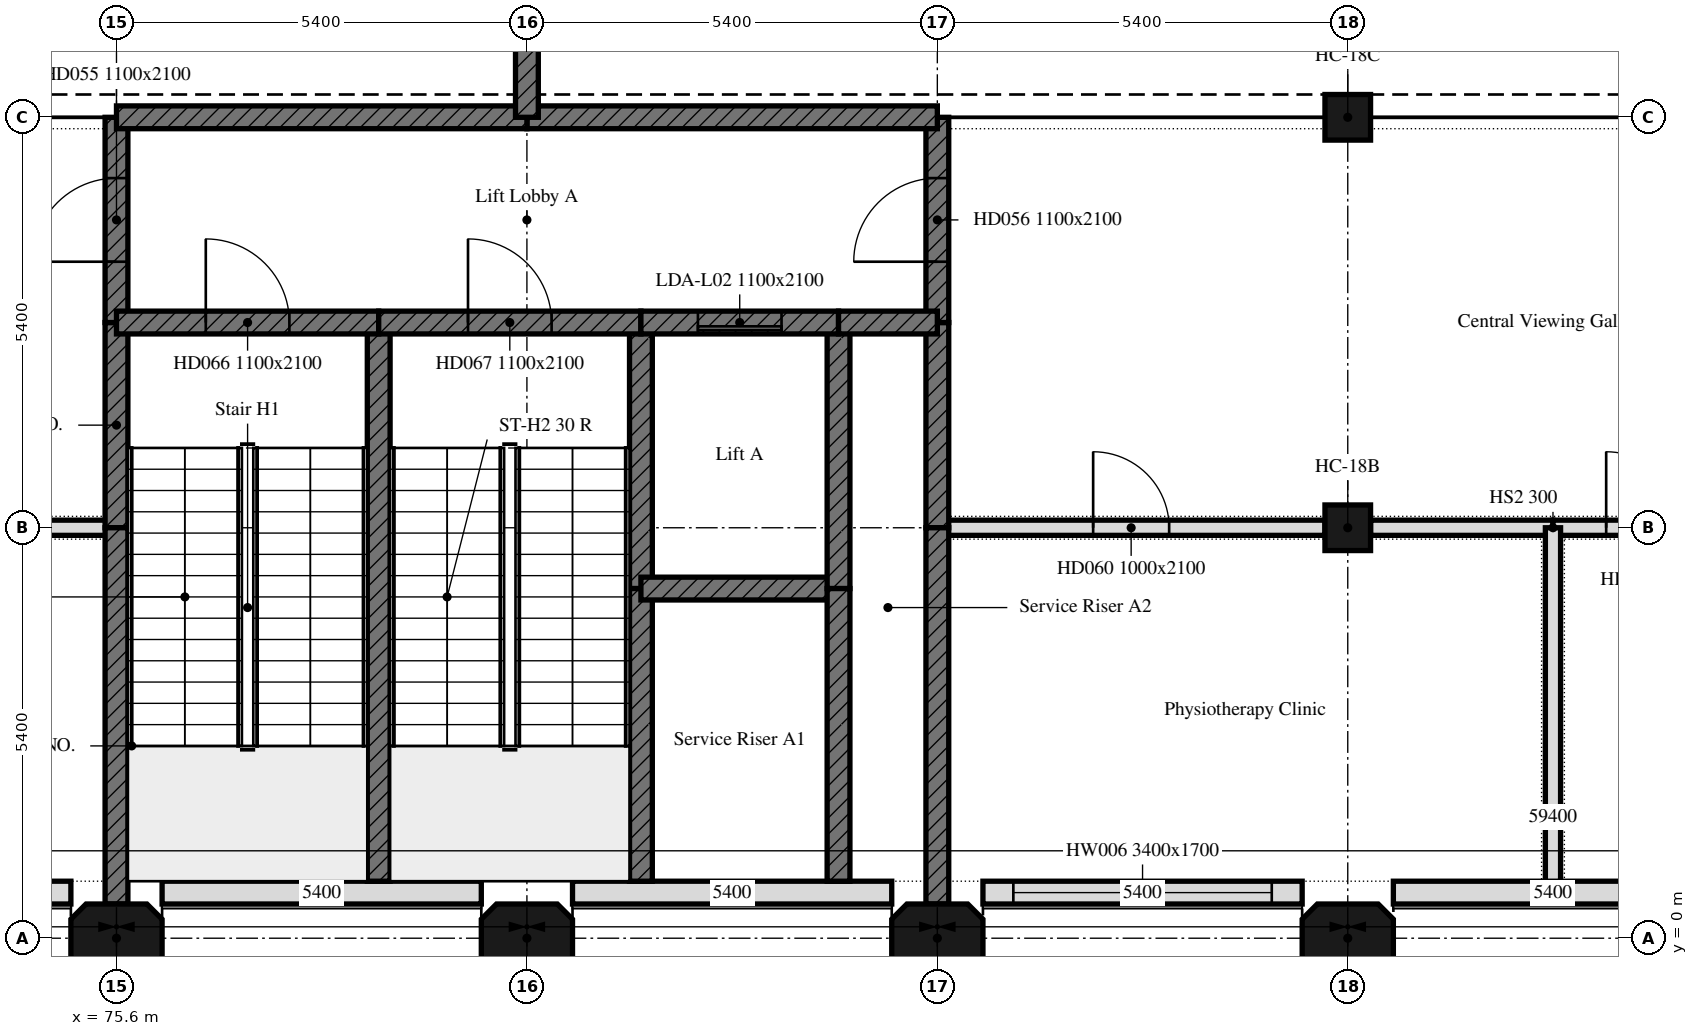
"""IFC4 building model, lengths in metres.
Left out: names, types, materials, properties, quantities, classifications, styles, units other than length and angle.
Written with IfcOpenShell. Run it as: python <this file> out.ifc"""

import sys

from ifc_helpers import new_model, si_unit, direction, frame, frame_2d, origin, origin_2d, place, context, subcontext, project, spatial, polyline, rectangle, outline, extrude, element, fill, save


model = new_model("IFC4")
c1 = context("Model", 3, precision=1e-05, world=origin(), true_north=direction((0.0, 1.0)))
c2 = subcontext(c1, "Body", "Model", "MODEL_VIEW")
j1 = project(units=[si_unit("LENGTHUNIT", "METRE"), si_unit("PLANEANGLEUNIT", "RADIAN")], contexts=[c1])
p1 = place(None, origin())
s1 = spatial("IfcSite", under=j1, at=p1, CompositionType="ELEMENT")
p2 = place(p1, origin())
s2 = spatial("IfcBuilding", under=s1, at=p2, CompositionType="ELEMENT")
p3 = place(p2, frame((0.0, 0.0, 14.4)))
s3 = spatial("IfcBuildingStorey", under=s2, at=p3, CompositionType="ELEMENT", Elevation=14.4)
for number, where, z_axis, x_axis in (
    (1, (75.6, 0.0, 0.0), (0.0, 0.0, 1.0), (1.0, 0.0, 0.0)),
    (2, (81.0, 0.0, 0.0), (0.0, 0.0, 1.0), (1.0, 0.0, 0.0)),
    (3, (86.4, 0.0, 0.0), (0.0, 0.0, 1.0), (1.0, 0.0, 0.0)),
    (4, (91.8, 0.0, 0.0), (0.0, 0.0, 1.0), (1.0, 0.0, 0.0)),
):
    element("IfcColumn", number, at=place(p3, frame(where, z_axis=z_axis, x_axis=x_axis)), inside=s3, PredefinedType="COLUMN", context=c2, shape_type="SweptSolid", body=[
        extrude(outline(polyline([(-0.4, -0.45), (0.4, -0.45), (0.6, -0.25), (0.6, 0.25), (0.4, 0.45), (-0.4, 0.45), (-0.6, 0.25), (-0.6, -0.25), (-0.4, -0.45)])), origin(), (0.0, 0.0, 1.0), 5.1),
    ])
for number, where, z_axis, x_axis in (
    (5, (91.8, 5.4, 0.0), (0.0, 0.0, 1.0), (1.0, 0.0, 0.0)),
    (6, (91.8, 10.8, 0.0), (0.0, 0.0, 1.0), (1.0, 0.0, 0.0)),
):
    element("IfcColumn", number, at=place(p3, frame(where, z_axis=z_axis, x_axis=x_axis)), inside=s3, PredefinedType="COLUMN", context=c2, shape_type="SweptSolid", body=[
        extrude(rectangle(XDim=0.6, YDim=0.6, at=origin_2d()), origin(), (0.0, 0.0, 1.0), 5.1),
    ])
for number, where, z_axis, x_axis in (
    (7, (70.8, 0.6, 0.0), (0.0, 0.0, 1.0), (1.0, 0.0, 0.0)),
    (8, (76.2, 0.6, 0.0), (0.0, 0.0, 1.0), (1.0, 0.0, 0.0)),
    (9, (81.6, 0.6, 0.0), (0.0, 0.0, 1.0), (1.0, 0.0, 0.0)),
):
    element("IfcWall", number, at=place(p3, frame(where, z_axis=z_axis, x_axis=x_axis)), inside=s3, PredefinedType="SOLIDWALL", context=c2, shape_type="SweptSolid", body=[
        extrude(rectangle(XDim=4.2, YDim=0.3, at=frame_2d((2.1, 0.0))), origin(), (0.0, 0.0, 1.0), 5.1),
    ])
p4 = place(p3, frame((87.0, 0.6, 0.0), z_axis=(0.0, 0.0, 1.0), x_axis=(1.0, 0.0, 0.0)))
e10 = element("IfcWall", 10, at=p4, inside=s3, PredefinedType="SOLIDWALL", context=c2, shape_type="SweptSolid", body=[
    extrude(rectangle(XDim=4.2, YDim=0.3, at=frame_2d((2.1, 0.0))), origin(), (0.0, 0.0, 1.0), 5.1),
])
p5 = place(p4, frame((0.4, 0.0, 0.9)))
e11 = element("IfcOpeningElement", 11, at=p5, cuts=e10, PredefinedType="OPENING", context=c2, shape_type="SweptSolid", body=[
    extrude(rectangle(XDim=3.4, YDim=1.7, at=frame_2d((1.7, 0.85))), frame((0.0, 0.15, 0.0), z_axis=(0.0, -1.0, 0.0), x_axis=(1.0, 0.0, 0.0)), (0.0, 0.0, 1.0), 0.3),
])
p6 = place(p3, frame((92.4, 0.6, 0.0), z_axis=(0.0, 0.0, 1.0), x_axis=(1.0, 0.0, 0.0)))
e12 = element("IfcWall", 12, at=p6, inside=s3, PredefinedType="SOLIDWALL", context=c2, shape_type="SweptSolid", body=[
    extrude(rectangle(XDim=4.2, YDim=0.3, at=frame_2d((2.1, 0.0))), origin(), (0.0, 0.0, 1.0), 5.1),
])
p7 = place(p3, frame((70.5, 5.4, 0.0), z_axis=(0.0, 0.0, 1.0), x_axis=(1.0, 0.0, 0.0)))
e13 = element("IfcWall", 13, at=p7, inside=s3, PredefinedType="PARTITIONING", context=c2, shape_type="SweptSolid", body=[
    extrude(rectangle(XDim=5.1, YDim=0.2, at=frame_2d((2.55, 0.0))), origin(), (0.0, 0.0, 1.0), 5.1),
])
p8 = place(p3, frame((75.6, 5.4, 0.0), z_axis=(0.0, 0.0, 1.0), x_axis=(0.0, 1.0, 0.0)))
e14 = element("IfcWall", 14, at=p8, inside=s3, PredefinedType="SHEAR", context=c2, shape_type="SweptSolid", body=[
    extrude(rectangle(XDim=2.7, YDim=0.3, at=frame_2d((1.35, 0.0))), origin(), (0.0, 0.0, 1.0), 5.1),
])
p9 = place(p3, frame((75.6, 8.1, 0.0), z_axis=(0.0, 0.0, 1.0), x_axis=(0.0, 1.0, 0.0)))
e15 = element("IfcWall", 15, at=p9, inside=s3, PredefinedType="SHEAR", context=c2, shape_type="SweptSolid", body=[
    extrude(rectangle(XDim=2.7, YDim=0.3, at=frame_2d((1.35, 0.0))), origin(), (0.0, 0.0, 1.0), 5.1),
])
p10 = place(p9, frame((0.8, 0.0, 0.0)))
e16 = element("IfcOpeningElement", 16, at=p10, cuts=e15, PredefinedType="OPENING", context=c2, shape_type="SweptSolid", body=[
    extrude(rectangle(XDim=1.1, YDim=2.1, at=frame_2d((0.55, 1.05))), frame((0.0, 0.15, 0.0), z_axis=(0.0, -1.0, 0.0), x_axis=(1.0, 0.0, 0.0)), (0.0, 0.0, 1.0), 0.3),
])
p11 = place(p3, frame((86.4, 5.4, 0.0), z_axis=(0.0, 0.0, 1.0), x_axis=(1.0, 0.0, 0.0)))
e17 = element("IfcWall", 17, at=p11, inside=s3, PredefinedType="PARTITIONING", context=c2, shape_type="SweptSolid", body=[
    extrude(rectangle(XDim=5.1, YDim=0.2, at=frame_2d((2.55, 0.0))), origin(), (0.0, 0.0, 1.0), 5.1),
])
p12 = place(p11, frame((2.05, 0.0, 0.0)))
e18 = element("IfcOpeningElement", 18, at=p12, cuts=e17, PredefinedType="OPENING", context=c2, shape_type="SweptSolid", body=[
    extrude(rectangle(XDim=1.0, YDim=2.1, at=frame_2d((0.5, 1.05))), frame((0.0, 0.1, 0.0), z_axis=(0.0, -1.0, 0.0), x_axis=(1.0, 0.0, 0.0)), (0.0, 0.0, 1.0), 0.2),
])
p13 = place(p3, frame((92.1, 5.4, 0.0), z_axis=(0.0, 0.0, 1.0), x_axis=(1.0, 0.0, 0.0)))
e19 = element("IfcWall", 19, at=p13, inside=s3, PredefinedType="PARTITIONING", context=c2, shape_type="SweptSolid", body=[
    extrude(rectangle(XDim=2.4, YDim=0.2, at=frame_2d((1.2, 0.0))), origin(), (0.0, 0.0, 1.0), 5.1),
])
p14 = place(p3, frame((94.5, 5.4, 0.0), z_axis=(0.0, 0.0, 1.0), x_axis=(1.0, 0.0, 0.0)))
e20 = element("IfcWall", 20, at=p14, inside=s3, PredefinedType="PARTITIONING", context=c2, shape_type="SweptSolid", body=[
    extrude(rectangle(XDim=2.4, YDim=0.2, at=frame_2d((1.2, 0.0))), origin(), (0.0, 0.0, 1.0), 5.1),
])
p15 = place(p14, frame((0.7, 0.0, 0.0)))
e21 = element("IfcOpeningElement", 21, at=p15, cuts=e20, PredefinedType="OPENING", context=c2, shape_type="SweptSolid", body=[
    extrude(rectangle(XDim=1.0, YDim=2.1, at=frame_2d((0.5, 1.05))), frame((0.0, 0.1, 0.0), z_axis=(0.0, -1.0, 0.0), x_axis=(1.0, 0.0, 0.0)), (0.0, 0.0, 1.0), 0.2),
])
p16 = place(p3, frame((86.4, 5.4, 0.0), z_axis=(0.0, 0.0, 1.0), x_axis=(0.0, 1.0, 0.0)))
e22 = element("IfcWall", 22, at=p16, inside=s3, PredefinedType="SHEAR", context=c2, shape_type="SweptSolid", body=[
    extrude(rectangle(XDim=2.7, YDim=0.3, at=frame_2d((1.35, 0.0))), origin(), (0.0, 0.0, 1.0), 5.1),
])
p17 = place(p3, frame((86.4, 8.1, 0.0), z_axis=(0.0, 0.0, 1.0), x_axis=(0.0, 1.0, 0.0)))
e23 = element("IfcWall", 23, at=p17, inside=s3, PredefinedType="SHEAR", context=c2, shape_type="SweptSolid", body=[
    extrude(rectangle(XDim=2.7, YDim=0.3, at=frame_2d((1.35, 0.0))), origin(), (0.0, 0.0, 1.0), 5.1),
])
p18 = place(p17, frame((0.8, 0.0, 0.0)))
e24 = element("IfcOpeningElement", 24, at=p18, cuts=e23, PredefinedType="OPENING", context=c2, shape_type="SweptSolid", body=[
    extrude(rectangle(XDim=1.1, YDim=2.1, at=frame_2d((0.55, 1.05))), frame((0.0, 0.15, 0.0), z_axis=(0.0, -1.0, 0.0), x_axis=(1.0, 0.0, 0.0)), (0.0, 0.0, 1.0), 0.3),
])
p19 = place(p3, frame((75.6, 0.45, 0.0), z_axis=(0.0, 0.0, 1.0), x_axis=(0.0, 1.0, 0.0)))
e25 = element("IfcWall", 25, at=p19, inside=s3, PredefinedType="SHEAR", context=c2, shape_type="SweptSolid", body=[
    extrude(rectangle(XDim=4.95, YDim=0.3, at=frame_2d((2.475, 0.0))), origin(), (0.0, 0.0, 1.0), 5.1),
])
p20 = place(p3, frame((94.5, 0.75, 0.0), z_axis=(0.0, 0.0, 1.0), x_axis=(0.0, 1.0, 0.0)))
e26 = element("IfcWall", 26, at=p20, inside=s3, PredefinedType="PARTITIONING", context=c2, shape_type="SweptSolid", body=[
    extrude(rectangle(XDim=4.65, YDim=0.2, at=frame_2d((2.325, 0.0))), origin(), (0.0, 0.0, 1.0), 5.1),
])
p21 = place(p3, frame((86.4, 0.45, 0.0), z_axis=(0.0, 0.0, 1.0), x_axis=(0.0, 1.0, 0.0)))
e27 = element("IfcWall", 27, at=p21, inside=s3, PredefinedType="SHEAR", context=c2, shape_type="SweptSolid", body=[
    extrude(rectangle(XDim=4.95, YDim=0.3, at=frame_2d((2.475, 0.0))), origin(), (0.0, 0.0, 1.0), 5.1),
])
p22 = place(p3, frame((79.05, 0.75, 0.0), z_axis=(0.0, 0.0, 1.0), x_axis=(0.0, 1.0, 0.0)))
e28 = element("IfcWall", 28, at=p22, inside=s3, PredefinedType="SHEAR", context=c2, shape_type="SweptSolid", body=[
    extrude(rectangle(XDim=7.35, YDim=0.3, at=frame_2d((3.675, 0.0))), origin(), (0.0, 0.0, 1.0), 5.1),
])
p23 = place(p3, frame((75.6, 8.1, 0.0), z_axis=(0.0, 0.0, 1.0), x_axis=(1.0, 0.0, 0.0)))
e29 = element("IfcWall", 29, at=p23, inside=s3, PredefinedType="SHEAR", context=c2, shape_type="SweptSolid", body=[
    extrude(rectangle(XDim=3.45, YDim=0.3, at=frame_2d((1.725, 0.0))), origin(), (0.0, 0.0, 1.0), 5.1),
])
p24 = place(p23, frame((1.175, 0.0, 0.0)))
e30 = element("IfcOpeningElement", 30, at=p24, cuts=e29, PredefinedType="OPENING", context=c2, shape_type="SweptSolid", body=[
    extrude(rectangle(XDim=1.1, YDim=2.1, at=frame_2d((0.55, 1.05))), frame((0.0, 0.15, 0.0), z_axis=(0.0, -1.0, 0.0), x_axis=(1.0, 0.0, 0.0)), (0.0, 0.0, 1.0), 0.3),
])
p25 = place(p3, frame((82.5, 4.6, 0.0), z_axis=(0.0, 0.0, 1.0), x_axis=(0.0, 1.0, 0.0)))
e31 = element("IfcWall", 31, at=p25, inside=s3, PredefinedType="SHEAR", context=c2, shape_type="SweptSolid", body=[
    extrude(rectangle(XDim=3.5, YDim=0.3, at=frame_2d((1.75, 0.0))), origin(), (0.0, 0.0, 1.0), 5.1),
])
p26 = place(p3, frame((82.5, 0.75, 0.0), z_axis=(0.0, 0.0, 1.0), x_axis=(0.0, 1.0, 0.0)))
e32 = element("IfcWall", 32, at=p26, inside=s3, PredefinedType="SHEAR", context=c2, shape_type="SweptSolid", body=[
    extrude(rectangle(XDim=3.85, YDim=0.3, at=frame_2d((1.925, 0.0))), origin(), (0.0, 0.0, 1.0), 5.1),
])
p27 = place(p3, frame((79.05, 8.1, 0.0), z_axis=(0.0, 0.0, 1.0), x_axis=(1.0, 0.0, 0.0)))
e33 = element("IfcWall", 33, at=p27, inside=s3, PredefinedType="SHEAR", context=c2, shape_type="SweptSolid", body=[
    extrude(rectangle(XDim=3.45, YDim=0.3, at=frame_2d((1.725, 0.0))), origin(), (0.0, 0.0, 1.0), 5.1),
])
p28 = place(p27, frame((1.175, 0.0, 0.0)))
e34 = element("IfcOpeningElement", 34, at=p28, cuts=e33, PredefinedType="OPENING", context=c2, shape_type="SweptSolid", body=[
    extrude(rectangle(XDim=1.1, YDim=2.1, at=frame_2d((0.55, 1.05))), frame((0.0, 0.15, 0.0), z_axis=(0.0, -1.0, 0.0), x_axis=(1.0, 0.0, 0.0)), (0.0, 0.0, 1.0), 0.3),
])
p29 = place(p3, frame((82.5, 4.6, 0.0), z_axis=(0.0, 0.0, 1.0), x_axis=(1.0, 0.0, 0.0)))
e35 = element("IfcWall", 35, at=p29, inside=s3, PredefinedType="SHEAR", context=c2, shape_type="SweptSolid", body=[
    extrude(rectangle(XDim=2.6, YDim=0.3, at=frame_2d((1.3, 0.0))), origin(), (0.0, 0.0, 1.0), 5.1),
])
p30 = place(p3, frame((85.1, 4.6, 0.0), z_axis=(0.0, 0.0, 1.0), x_axis=(0.0, 1.0, 0.0)))
e36 = element("IfcWall", 36, at=p30, inside=s3, PredefinedType="SHEAR", context=c2, shape_type="SweptSolid", body=[
    extrude(rectangle(XDim=3.5, YDim=0.3, at=frame_2d((1.75, 0.0))), origin(), (0.0, 0.0, 1.0), 5.1),
])
p31 = place(p3, frame((82.5, 8.1, 0.0), z_axis=(0.0, 0.0, 1.0), x_axis=(1.0, 0.0, 0.0)))
e37 = element("IfcWall", 37, at=p31, inside=s3, PredefinedType="SHEAR", context=c2, shape_type="SweptSolid", body=[
    extrude(rectangle(XDim=2.6, YDim=0.3, at=frame_2d((1.3, 0.0))), origin(), (0.0, 0.0, 1.0), 5.1),
])
p32 = place(p31, frame((0.75, 0.0, 0.0)))
e38 = element("IfcOpeningElement", 38, at=p32, cuts=e37, PredefinedType="OPENING", context=c2, shape_type="SweptSolid", body=[
    extrude(rectangle(XDim=1.1, YDim=2.1, at=frame_2d((0.55, 1.05))), frame((0.0, 0.15, 0.0), z_axis=(0.0, -1.0, 0.0), x_axis=(1.0, 0.0, 0.0)), (0.0, 0.0, 1.0), 0.3),
])
p33 = place(p3, frame((85.1, 0.75, 0.0), z_axis=(0.0, 0.0, 1.0), x_axis=(0.0, 1.0, 0.0)))
e39 = element("IfcWall", 39, at=p33, inside=s3, PredefinedType="SHEAR", context=c2, shape_type="SweptSolid", body=[
    extrude(rectangle(XDim=3.85, YDim=0.3, at=frame_2d((1.925, 0.0))), origin(), (0.0, 0.0, 1.0), 5.1),
])
p34 = place(p3, frame((85.1, 8.1, 0.0), z_axis=(0.0, 0.0, 1.0), x_axis=(1.0, 0.0, 0.0)))
e40 = element("IfcWall", 40, at=p34, inside=s3, PredefinedType="SHEAR", context=c2, shape_type="SweptSolid", body=[
    extrude(rectangle(XDim=1.3, YDim=0.3, at=frame_2d((0.65, 0.0))), origin(), (0.0, 0.0, 1.0), 5.1),
])
for number, where, z_axis, x_axis in (
    (41, (81.0, 10.8, 0.0), (0.0, 0.0, 1.0), (1.0, 0.0, 0.0)),
    (42, (75.6, 10.8, 0.0), (0.0, 0.0, 1.0), (1.0, 0.0, 0.0)),
):
    element("IfcWall", number, at=place(p3, frame(where, z_axis=z_axis, x_axis=x_axis)), inside=s3, PredefinedType="SHEAR", context=c2, shape_type="SweptSolid", body=[
        extrude(rectangle(XDim=5.4, YDim=0.3, at=frame_2d((2.7, 0.0))), origin(), (0.0, 0.0, 1.0), 5.1),
    ])
p35 = place(p3, frame((81.0, 10.8, 0.0), z_axis=(0.0, 0.0, 1.0), x_axis=(0.0, 1.0, 0.0)))
e43 = element("IfcWall", 43, at=p35, inside=s3, PredefinedType="SHEAR", context=c2, shape_type="SweptSolid", body=[
    extrude(rectangle(XDim=31.95, YDim=0.3, at=frame_2d((15.975, 0.0))), origin(), (0.0, 0.0, 1.0), 5.4),
])
p36 = place(p5, origin())
e44 = element("IfcWindow", 44, at=p36, inside=s3, PartitioningType="SINGLE_PANEL", PredefinedType="WINDOW", context=c2, shape_type="SweptSolid", body=[
    extrude(rectangle(XDim=3.4, YDim=1.7, at=frame_2d((1.7, 0.85))), frame((0.0, 0.03, 0.0), z_axis=(0.0, -1.0, 0.0), x_axis=(1.0, 0.0, 0.0)), (0.0, 0.0, 1.0), 0.06),
])
fill(e11, e44)
p37 = place(p10, origin())
e45 = element("IfcDoor", 45, at=p37, inside=s3, OperationType="SINGLE_SWING_LEFT", PredefinedType="DOOR", context=c2, shape_type="SweptSolid", body=[
    extrude(rectangle(XDim=1.1, YDim=2.1, at=frame_2d((0.55, 1.05))), frame((0.0, 0.025, 0.0), z_axis=(0.0, -1.0, 0.0), x_axis=(1.0, 0.0, 0.0)), (0.0, 0.0, 1.0), 0.05),
])
fill(e16, e45)
p38 = place(p18, origin())
e46 = element("IfcDoor", 46, at=p38, inside=s3, OperationType="SINGLE_SWING_LEFT", PredefinedType="DOOR", context=c2, shape_type="SweptSolid", body=[
    extrude(rectangle(XDim=1.1, YDim=2.1, at=frame_2d((0.55, 1.05))), frame((0.0, 0.025, 0.0), z_axis=(0.0, -1.0, 0.0), x_axis=(1.0, 0.0, 0.0)), (0.0, 0.0, 1.0), 0.05),
])
fill(e24, e46)
p39 = place(p12, origin())
e47 = element("IfcDoor", 47, at=p39, inside=s3, OperationType="SINGLE_SWING_LEFT", PredefinedType="DOOR", context=c2, shape_type="SweptSolid", body=[
    extrude(rectangle(XDim=1.0, YDim=2.1, at=frame_2d((0.5, 1.05))), frame((0.0, 0.025, 0.0), z_axis=(0.0, -1.0, 0.0), x_axis=(1.0, 0.0, 0.0)), (0.0, 0.0, 1.0), 0.05),
])
fill(e18, e47)
p40 = place(p15, origin())
e48 = element("IfcDoor", 48, at=p40, inside=s3, OperationType="SINGLE_SWING_LEFT", PredefinedType="DOOR", context=c2, shape_type="SweptSolid", body=[
    extrude(rectangle(XDim=1.0, YDim=2.1, at=frame_2d((0.5, 1.05))), frame((0.0, 0.025, 0.0), z_axis=(0.0, -1.0, 0.0), x_axis=(1.0, 0.0, 0.0)), (0.0, 0.0, 1.0), 0.05),
])
fill(e21, e48)
p41 = place(p24, origin())
e49 = element("IfcDoor", 49, at=p41, inside=s3, OperationType="SINGLE_SWING_LEFT", PredefinedType="DOOR", context=c2, shape_type="SweptSolid", body=[
    extrude(rectangle(XDim=1.1, YDim=2.1, at=frame_2d((0.55, 1.05))), frame((0.0, 0.025, 0.0), z_axis=(0.0, -1.0, 0.0), x_axis=(1.0, 0.0, 0.0)), (0.0, 0.0, 1.0), 0.05),
])
fill(e30, e49)
p42 = place(p28, origin())
e50 = element("IfcDoor", 50, at=p42, inside=s3, OperationType="SINGLE_SWING_LEFT", PredefinedType="DOOR", context=c2, shape_type="SweptSolid", body=[
    extrude(rectangle(XDim=1.1, YDim=2.1, at=frame_2d((0.55, 1.05))), frame((0.0, 0.025, 0.0), z_axis=(0.0, -1.0, 0.0), x_axis=(1.0, 0.0, 0.0)), (0.0, 0.0, 1.0), 0.05),
])
fill(e34, e50)
p43 = place(p32, origin())
e51 = element("IfcDoor", 51, at=p43, inside=s3, OperationType="SLIDING_TO_LEFT", PredefinedType="DOOR", context=c2, shape_type="SweptSolid", body=[
    extrude(rectangle(XDim=1.1, YDim=2.1, at=frame_2d((0.55, 1.05))), frame((0.0, 0.025, 0.0), z_axis=(0.0, -1.0, 0.0), x_axis=(1.0, 0.0, 0.0)), (0.0, 0.0, 1.0), 0.05),
])
fill(e38, e51)
save(model, sys.argv[1])
